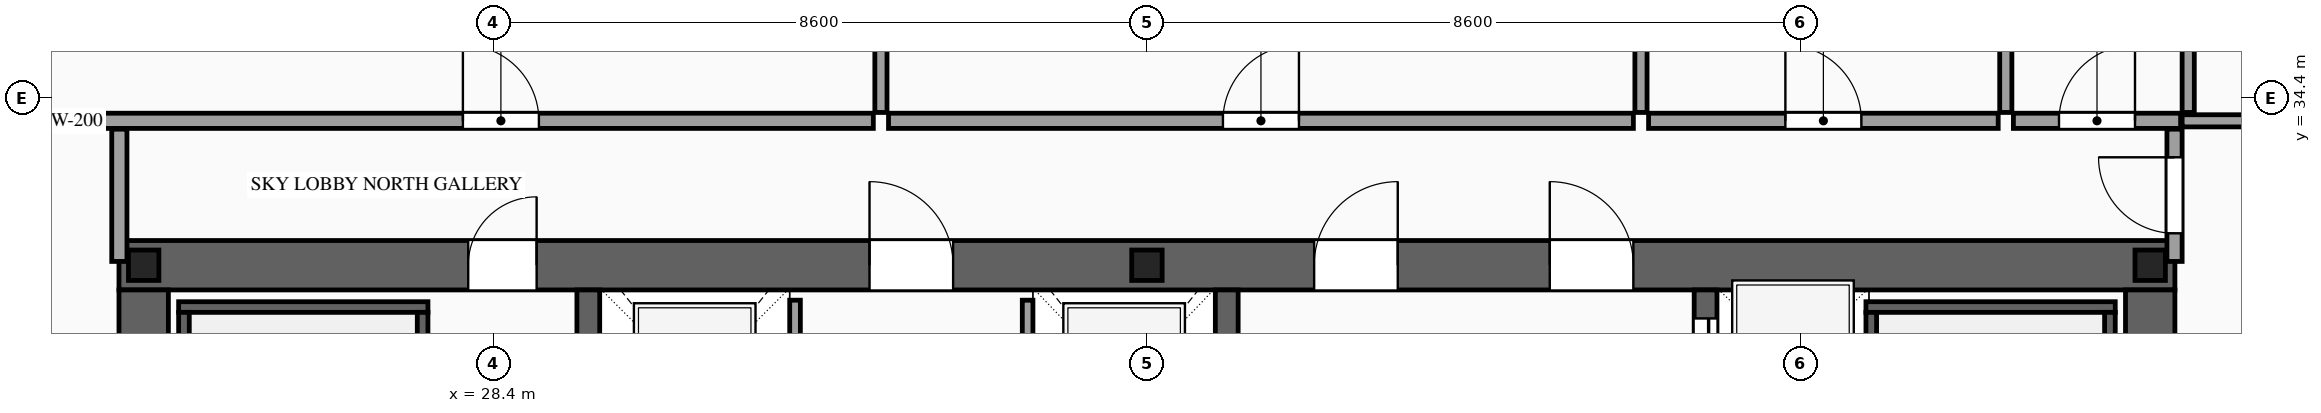
"""IFC4 building model, lengths in metres.
Left out: names, types, materials, properties, quantities, classifications, styles, units other than length and angle.
Written with IfcOpenShell. Run it as: python <this file> out.ifc"""

import sys

from ifc_helpers import new_model, si_unit, direction, frame, frame_2d, origin, origin_2d, place, context, subcontext, project, spatial, rectangle, i_section, extrude, source, transform, mapped, element, fill, save


model = new_model("IFC4")
c1 = context("Model", 3, precision=1e-05, world=origin(), true_north=direction((0.0, 1.0)))
c2 = subcontext(c1, "Body", "Model", "MODEL_VIEW")
j1 = project(units=[si_unit("LENGTHUNIT", "METRE"), si_unit("PLANEANGLEUNIT", "RADIAN")], contexts=[c1])
p1 = place(None, origin())
s1 = spatial("IfcSite", under=j1, at=p1, CompositionType="ELEMENT")
p2 = place(p1, origin())
s2 = spatial("IfcBuilding", under=s1, at=p2, CompositionType="ELEMENT")
p3 = place(p2, frame((0.0, 0.0, 166.8)))
s3 = spatial("IfcBuildingStorey", under=s2, at=p3, CompositionType="ELEMENT", Elevation=166.8)
p4 = place(p3, frame((23.475, 32.2, 0.0), z_axis=(0.0, 0.0, 1.0), x_axis=(1.0, 0.0, 0.0)))
e1 = element("IfcWall", 1, at=p4, inside=s3, PredefinedType="SHEAR", context=c2, shape_type="SweptSolid", body=[
    extrude(rectangle(XDim=27.05, YDim=0.65, at=frame_2d((13.525, 0.0))), origin(), (0.0, 0.0, 1.0), 4.8),
])
p5 = place(p4, frame((4.595, 0.0, 0.0)))
e2 = element("IfcOpeningElement", 2, at=p5, cuts=e1, PredefinedType="OPENING", context=c2, shape_type="SweptSolid", body=[
    extrude(rectangle(XDim=0.9, YDim=2.15, at=frame_2d((0.45, 1.075))), frame((0.0, 0.34, 0.0), z_axis=(0.0, -1.0, 0.0), x_axis=(1.0, 0.0, 0.0)), (0.0, 0.0, 1.0), 0.68),
])
p6 = place(p4, frame((9.875, 0.0, 0.0)))
e3 = element("IfcOpeningElement", 3, at=p6, cuts=e1, PredefinedType="OPENING", context=c2, shape_type="SweptSolid", body=[
    extrude(rectangle(XDim=1.1, YDim=2.2, at=frame_2d((0.55, 1.1))), frame((0.0, 0.34, 0.0), z_axis=(0.0, -1.0, 0.0), x_axis=(1.0, 0.0, 0.0)), (0.0, 0.0, 1.0), 0.68),
])
p7 = place(p4, frame((15.725, 0.0, 0.0)))
e4 = element("IfcOpeningElement", 4, at=p7, cuts=e1, PredefinedType="OPENING", context=c2, shape_type="SweptSolid", body=[
    extrude(rectangle(XDim=1.1, YDim=2.2, at=frame_2d((0.55, 1.1))), frame((0.0, 0.34, 0.0), z_axis=(0.0, -1.0, 0.0), x_axis=(1.0, 0.0, 0.0)), (0.0, 0.0, 1.0), 0.68),
])
p8 = place(p4, frame((18.825, 0.0, 0.0)))
e5 = element("IfcOpeningElement", 5, at=p8, cuts=e1, PredefinedType="OPENING", context=c2, shape_type="SweptSolid", body=[
    extrude(rectangle(XDim=1.1, YDim=2.2, at=frame_2d((0.55, 1.1))), frame((0.0, 0.34, 0.0), z_axis=(0.0, -1.0, 0.0), x_axis=(1.0, 0.0, 0.0)), (0.0, 0.0, 1.0), 0.68),
])
m1 = source(origin(), c2, "Body", "SweptSolid", [
    extrude(rectangle(XDim=12.15, YDim=0.65, at=frame_2d((6.075, 0.0))), origin(), (0.0, 0.0, 1.0), 4.8),
])
for number, where, z_axis, x_axis in (
    (6, (23.8, 19.725, 0.0), (0.0, 0.0, 1.0), (0.0, 1.0, 0.0)),
    (7, (50.2, 19.725, 0.0), (0.0, 0.0, 1.0), (0.0, 1.0, 0.0)),
):
    element("IfcWall", number, at=place(p3, frame(where, z_axis=z_axis, x_axis=x_axis)), inside=s3, PredefinedType="SHEAR", context=c2, shape_type="MappedRepresentation", body=[
        mapped(m1, transform((0.0, 0.0, 0.0), scale=1.0)),
    ])
m2 = source(origin(), c2, "Body", "SweptSolid", [
    extrude(rectangle(XDim=12.15, YDim=0.3, at=frame_2d((6.075, 0.0))), origin(), (0.0, 0.0, 1.0), 4.8),
])
for number, where, z_axis, x_axis in (
    (8, (29.65, 19.725, 0.0), (0.0, 0.0, 1.0), (0.0, 1.0, 0.0)),
    (9, (38.05, 19.725, 0.0), (0.0, 0.0, 1.0), (0.0, 1.0, 0.0)),
):
    element("IfcWall", number, at=place(p3, frame(where, z_axis=z_axis, x_axis=x_axis)), inside=s3, PredefinedType="SOLIDWALL", context=c2, shape_type="MappedRepresentation", body=[
        mapped(m2, transform((0.0, 0.0, 0.0), scale=1.0)),
    ])
p9 = place(p3, frame((44.35, 19.725, 0.0), z_axis=(0.0, 0.0, 1.0), x_axis=(0.0, 1.0, 0.0)))
e10 = element("IfcWall", 10, at=p9, inside=s3, PredefinedType="SOLIDWALL", context=c2, shape_type="SweptSolid", body=[
    extrude(rectangle(XDim=12.15, YDim=0.3, at=frame_2d((6.075, 0.0))), origin(), (0.0, 0.0, 1.0), 4.8),
])
p10 = place(p9, frame((6.475, 0.0, 0.0)))
e11 = element("IfcOpeningElement", 11, at=p10, cuts=e10, PredefinedType="OPENING", context=c2, shape_type="SweptSolid", body=[
    extrude(rectangle(XDim=1.1, YDim=2.2, at=frame_2d((0.55, 1.1))), frame((0.0, 0.165, 0.0), z_axis=(0.0, -1.0, 0.0), x_axis=(1.0, 0.0, 0.0)), (0.0, 0.0, 1.0), 0.33),
])
p11 = place(p9, frame((8.575, 0.0, 0.0)))
e12 = element("IfcOpeningElement", 12, at=p11, cuts=e10, PredefinedType="OPENING", context=c2, shape_type="SweptSolid", body=[
    extrude(rectangle(XDim=1.1, YDim=2.2, at=frame_2d((0.55, 1.1))), frame((0.0, 0.165, 0.0), z_axis=(0.0, -1.0, 0.0), x_axis=(1.0, 0.0, 0.0)), (0.0, 0.0, 1.0), 0.33),
])
p12 = place(p9, frame((10.675, 0.0, 0.0)))
e13 = element("IfcOpeningElement", 13, at=p12, cuts=e10, PredefinedType="OPENING", context=c2, shape_type="SweptSolid", body=[
    extrude(rectangle(XDim=1.1, YDim=2.2, at=frame_2d((0.55, 1.1))), frame((0.0, 0.165, 0.0), z_axis=(0.0, -1.0, 0.0), x_axis=(1.0, 0.0, 0.0)), (0.0, 0.0, 1.0), 0.33),
])
m3 = source(origin(), c2, "Body", "SweptSolid", [
    extrude(i_section(OverallWidth=0.4, OverallDepth=0.4, WebThickness=0.013, FlangeThickness=0.021, at=origin_2d()), origin(), (0.0, 0.0, 1.0), 4.8),
])
for number, where, z_axis, x_axis in (
    (14, (23.8, 32.2, 0.0), (0.0, 0.0, 1.0), (1.0, 0.0, 0.0)),
    (15, (37.0, 32.2, 0.0), (0.0, 0.0, 1.0), (1.0, 0.0, 0.0)),
    (16, (50.2, 32.2, 0.0), (0.0, 0.0, 1.0), (1.0, 0.0, 0.0)),
):
    element("IfcColumn", number, at=place(p3, frame(where, z_axis=z_axis, x_axis=x_axis)), inside=s3, PredefinedType="COLUMN", context=c2, shape_type="MappedRepresentation", body=[
        mapped(m3, transform((0.0, 0.0, 0.0), scale=1.0)),
    ])
p13 = place(p3, frame((32.37, 29.4, 0.0), z_axis=(0.0, 0.0, 1.0), x_axis=(0.0, 1.0, 0.0)))
e17 = element("IfcWall", 17, at=p13, inside=s3, PredefinedType="SOLIDWALL", context=c2, shape_type="SweptSolid", body=[
    extrude(rectangle(XDim=2.34, YDim=0.14, at=frame_2d((1.17, 0.0))), origin(), (0.0, 0.0, 1.0), 4.5),
])
p14 = place(p13, frame((0.62, 0.0, 0.0)))
e18 = element("IfcOpeningElement", 18, at=p14, cuts=e17, PredefinedType="OPENING", context=c2, shape_type="SweptSolid", body=[
    extrude(rectangle(XDim=1.1, YDim=2.2, at=frame_2d((0.55, 1.1))), frame((0.0, 0.085, 0.0), z_axis=(0.0, -1.0, 0.0), x_axis=(1.0, 0.0, 0.0)), (0.0, 0.0, 1.0), 0.17),
])
p15 = place(p3, frame((35.43, 29.4, 0.0), z_axis=(0.0, 0.0, 1.0), x_axis=(0.0, 1.0, 0.0)))
e19 = element("IfcWall", 19, at=p15, inside=s3, PredefinedType="SOLIDWALL", context=c2, shape_type="SweptSolid", body=[
    extrude(rectangle(XDim=2.34, YDim=0.14, at=frame_2d((1.17, 0.0))), origin(), (0.0, 0.0, 1.0), 4.5),
])
p16 = place(p15, frame((0.62, 0.0, 0.0)))
e20 = element("IfcOpeningElement", 20, at=p16, cuts=e19, PredefinedType="OPENING", context=c2, shape_type="SweptSolid", body=[
    extrude(rectangle(XDim=1.1, YDim=2.2, at=frame_2d((0.55, 1.1))), frame((0.0, 0.085, 0.0), z_axis=(0.0, -1.0, 0.0), x_axis=(1.0, 0.0, 0.0)), (0.0, 0.0, 1.0), 0.17),
])
m4 = source(origin(), c2, "Body", "SweptSolid", [
    extrude(rectangle(XDim=3.28, YDim=0.14, at=frame_2d((1.64, 0.0))), origin(), (0.0, 0.0, 1.0), 4.5),
])
p17 = place(p3, frame((24.26, 31.65, 0.0), z_axis=(0.0, 0.0, 1.0), x_axis=(1.0, 0.0, 0.0)))
e21 = element("IfcWall", 21, at=p17, inside=s3, PredefinedType="SOLIDWALL", context=c2, shape_type="MappedRepresentation", body=[
    mapped(m4, transform((0.0, 0.0, 0.0), scale=1.0)),
])
m5 = source(origin(), c2, "Body", "SweptSolid", [
    extrude(rectangle(XDim=8.94, YDim=0.14, at=frame_2d((4.47, 0.0))), origin(), (0.0, 0.0, 1.0), 4.5),
])
for number, where, z_axis, x_axis in (
    (22, (24.33, 22.64, 0.0), (0.0, 0.0, 1.0), (0.0, 1.0, 0.0)),
    (23, (27.47, 22.64, 0.0), (0.0, 0.0, 1.0), (0.0, 1.0, 0.0)),
):
    element("IfcWall", number, at=place(p3, frame(where, z_axis=z_axis, x_axis=x_axis)), inside=s3, PredefinedType="SOLIDWALL", context=c2, shape_type="MappedRepresentation", body=[
        mapped(m5, transform((0.0, 0.0, 0.0), scale=1.0)),
    ])
p18 = place(p3, frame((46.46, 31.65, 0.0), z_axis=(0.0, 0.0, 1.0), x_axis=(1.0, 0.0, 0.0)))
e24 = element("IfcWall", 24, at=p18, inside=s3, PredefinedType="SOLIDWALL", context=c2, shape_type="MappedRepresentation", body=[
    mapped(m4, transform((0.0, 0.0, 0.0), scale=1.0)),
])
for number, where, z_axis, x_axis in (
    (25, (46.53, 22.64, 0.0), (0.0, 0.0, 1.0), (0.0, 1.0, 0.0)),
    (26, (49.67, 22.64, 0.0), (0.0, 0.0, 1.0), (0.0, 1.0, 0.0)),
):
    element("IfcWall", number, at=place(p3, frame(where, z_axis=z_axis, x_axis=x_axis)), inside=s3, PredefinedType="SOLIDWALL", context=c2, shape_type="MappedRepresentation", body=[
        mapped(m5, transform((0.0, 0.0, 0.0), scale=1.0)),
    ])
m6 = source(origin(), c2, "Body", "SweptSolid", [
    extrude(rectangle(XDim=1.74, YDim=0.2, at=frame_2d((0.87, 0.0))), origin(), (0.0, 0.0, 1.0), 4.5),
])
p19 = place(p3, frame((23.48, 32.25, 0.0), z_axis=(0.0, 0.0, 1.0), x_axis=(0.0, 1.0, 0.0)))
e27 = element("IfcWall", 27, at=p19, inside=s3, PredefinedType="PARTITIONING", context=c2, shape_type="MappedRepresentation", body=[
    mapped(m6, transform((0.0, 0.0, 0.0), scale=1.0)),
])
p20 = place(p3, frame((50.52, 32.25, 0.0), z_axis=(0.0, 0.0, 1.0), x_axis=(0.0, 1.0, 0.0)))
e28 = element("IfcWall", 28, at=p20, inside=s3, PredefinedType="PARTITIONING", context=c2, shape_type="SweptSolid", body=[
    extrude(rectangle(XDim=1.74, YDim=0.2, at=frame_2d((0.87, 0.0))), origin(), (0.0, 0.0, 1.0), 4.5),
])
p21 = place(p20, frame((0.37, 0.0, 0.0)))
e29 = element("IfcOpeningElement", 29, at=p21, cuts=e28, PredefinedType="OPENING", context=c2, shape_type="SweptSolid", body=[
    extrude(rectangle(XDim=1.0, YDim=2.2, at=frame_2d((0.5, 1.1))), frame((0.0, 0.115, 0.0), z_axis=(0.0, -1.0, 0.0), x_axis=(1.0, 0.0, 0.0)), (0.0, 0.0, 1.0), 0.23),
])
m7 = source(origin(), c2, "Body", "SweptSolid", [
    extrude(rectangle(XDim=8.33, YDim=0.16, at=frame_2d((4.165, 0.0))), origin(), (0.0, 0.0, 1.0), 4.5),
])
p22 = place(p3, frame((50.62, 34.1, 0.0), z_axis=(0.0, 0.0, 1.0), x_axis=(1.0, 0.0, 0.0)))
e30 = element("IfcWall", 30, at=p22, inside=s3, PredefinedType="PARTITIONING", context=c2, shape_type="MappedRepresentation", body=[
    mapped(m7, transform((0.0, 0.0, 0.0), scale=1.0)),
])
p23 = place(p3, frame((17.94, 34.1, 0.0), z_axis=(0.0, 0.0, 1.0), x_axis=(1.0, 0.0, 0.0)))
e31 = element("IfcWall", 31, at=p23, inside=s3, PredefinedType="PARTITIONING", context=c2, shape_type="SweptSolid", body=[
    extrude(rectangle(XDim=15.46, YDim=0.2, at=frame_2d((7.73, 0.0))), origin(), (0.0, 0.0, 1.0), 4.5),
])
p24 = place(p23, frame((10.06, 0.0, 0.0)))
e32 = element("IfcOpeningElement", 32, at=p24, cuts=e31, PredefinedType="OPENING", context=c2, shape_type="SweptSolid", body=[
    extrude(rectangle(XDim=1.0, YDim=2.2, at=frame_2d((0.5, 1.1))), frame((0.0, 0.115, 0.0), z_axis=(0.0, -1.0, 0.0), x_axis=(1.0, 0.0, 0.0)), (0.0, 0.0, 1.0), 0.23),
])
m8 = source(origin(), c2, "Body", "SweptSolid", [
    extrude(rectangle(XDim=13.54, YDim=0.16, at=frame_2d((6.77, 0.0))), origin(), (0.0, 0.0, 1.0), 4.5),
])
p25 = place(p3, frame((33.5, 34.21, 0.0), z_axis=(0.0, 0.0, 1.0), x_axis=(0.0, 1.0, 0.0)))
e33 = element("IfcWall", 33, at=p25, inside=s3, PredefinedType="PARTITIONING", context=c2, shape_type="MappedRepresentation", body=[
    mapped(m8, transform((0.0, 0.0, 0.0), scale=1.0)),
])
p26 = place(p3, frame((33.6, 34.1, 0.0), z_axis=(0.0, 0.0, 1.0), x_axis=(1.0, 0.0, 0.0)))
e34 = element("IfcWall", 34, at=p26, inside=s3, PredefinedType="PARTITIONING", context=c2, shape_type="SweptSolid", body=[
    extrude(rectangle(XDim=9.8, YDim=0.2, at=frame_2d((4.9, 0.0))), origin(), (0.0, 0.0, 1.0), 4.5),
])
p27 = place(p26, frame((4.4, 0.0, 0.0)))
e35 = element("IfcOpeningElement", 35, at=p27, cuts=e34, PredefinedType="OPENING", context=c2, shape_type="SweptSolid", body=[
    extrude(rectangle(XDim=1.0, YDim=2.2, at=frame_2d((0.5, 1.1))), frame((0.0, 0.115, 0.0), z_axis=(0.0, -1.0, 0.0), x_axis=(1.0, 0.0, 0.0)), (0.0, 0.0, 1.0), 0.23),
])
p28 = place(p3, frame((43.5, 34.21, 0.0), z_axis=(0.0, 0.0, 1.0), x_axis=(0.0, 1.0, 0.0)))
e36 = element("IfcWall", 36, at=p28, inside=s3, PredefinedType="PARTITIONING", context=c2, shape_type="MappedRepresentation", body=[
    mapped(m8, transform((0.0, 0.0, 0.0), scale=1.0)),
])
p29 = place(p3, frame((43.6, 34.1, 0.0), z_axis=(0.0, 0.0, 1.0), x_axis=(1.0, 0.0, 0.0)))
e37 = element("IfcWall", 37, at=p29, inside=s3, PredefinedType="PARTITIONING", context=c2, shape_type="SweptSolid", body=[
    extrude(rectangle(XDim=4.6, YDim=0.2, at=frame_2d((2.3, 0.0))), origin(), (0.0, 0.0, 1.0), 4.5),
])
p30 = place(p29, frame((1.8, 0.0, 0.0)))
e38 = element("IfcOpeningElement", 38, at=p30, cuts=e37, PredefinedType="OPENING", context=c2, shape_type="SweptSolid", body=[
    extrude(rectangle(XDim=1.0, YDim=2.2, at=frame_2d((0.5, 1.1))), frame((0.0, 0.115, 0.0), z_axis=(0.0, -1.0, 0.0), x_axis=(1.0, 0.0, 0.0)), (0.0, 0.0, 1.0), 0.23),
])
p31 = place(p3, frame((48.3, 34.21, 0.0), z_axis=(0.0, 0.0, 1.0), x_axis=(0.0, 1.0, 0.0)))
e39 = element("IfcWall", 39, at=p31, inside=s3, PredefinedType="PARTITIONING", context=c2, shape_type="MappedRepresentation", body=[
    mapped(m8, transform((0.0, 0.0, 0.0), scale=1.0)),
])
p32 = place(p3, frame((48.4, 34.1, 0.0), z_axis=(0.0, 0.0, 1.0), x_axis=(1.0, 0.0, 0.0)))
e40 = element("IfcWall", 40, at=p32, inside=s3, PredefinedType="PARTITIONING", context=c2, shape_type="SweptSolid", body=[
    extrude(rectangle(XDim=2.2, YDim=0.2, at=frame_2d((1.1, 0.0))), origin(), (0.0, 0.0, 1.0), 4.5),
])
p33 = place(p32, frame((0.6, 0.0, 0.0)))
e41 = element("IfcOpeningElement", 41, at=p33, cuts=e40, PredefinedType="OPENING", context=c2, shape_type="SweptSolid", body=[
    extrude(rectangle(XDim=1.0, YDim=2.2, at=frame_2d((0.5, 1.1))), frame((0.0, 0.115, 0.0), z_axis=(0.0, -1.0, 0.0), x_axis=(1.0, 0.0, 0.0)), (0.0, 0.0, 1.0), 0.23),
])
p34 = place(p3, frame((50.7, 34.21, 0.0), z_axis=(0.0, 0.0, 1.0), x_axis=(0.0, 1.0, 0.0)))
e42 = element("IfcWall", 42, at=p34, inside=s3, PredefinedType="PARTITIONING", context=c2, shape_type="MappedRepresentation", body=[
    mapped(m8, transform((0.0, 0.0, 0.0), scale=1.0)),
])
m9 = source(origin(), c2, "Body", "SweptSolid", [
    extrude(rectangle(XDim=1.1, YDim=2.2, at=frame_2d((0.55, 1.1))), frame((0.0, 0.025, 0.0), z_axis=(0.0, -1.0, 0.0), x_axis=(1.0, 0.0, 0.0)), (0.0, 0.0, 1.0), 0.05),
])
p35 = place(p12, origin())
e43 = element("IfcDoor", 43, at=p35, inside=s3, OperationType="SLIDING_TO_LEFT", PredefinedType="DOOR", context=c2, shape_type="MappedRepresentation", body=[
    mapped(m9, transform((0.0, 0.0, 0.0), scale=1.0)),
])
fill(e13, e43)
m10 = source(origin(), c2, "Body", "SweptSolid", [
    extrude(rectangle(XDim=0.9, YDim=2.15, at=frame_2d((0.45, 1.075))), frame((0.0, 0.025, 0.0), z_axis=(0.0, -1.0, 0.0), x_axis=(1.0, 0.0, 0.0)), (0.0, 0.0, 1.0), 0.05),
])
p36 = place(p5, origin())
e44 = element("IfcDoor", 44, at=p36, inside=s3, OperationType="SINGLE_SWING_RIGHT", PredefinedType="DOOR", context=c2, shape_type="MappedRepresentation", body=[
    mapped(m10, transform((0.0, 0.0, 0.0), scale=1.0)),
])
fill(e2, e44)
m11 = source(origin(), c2, "Body", "SweptSolid", [
    extrude(rectangle(XDim=1.1, YDim=2.2, at=frame_2d((0.55, 1.1))), frame((0.0, 0.025, 0.0), z_axis=(0.0, -1.0, 0.0), x_axis=(1.0, 0.0, 0.0)), (0.0, 0.0, 1.0), 0.05),
])
p37 = place(p6, origin())
e45 = element("IfcDoor", 45, at=p37, inside=s3, OperationType="SINGLE_SWING_LEFT", PredefinedType="DOOR", context=c2, shape_type="MappedRepresentation", body=[
    mapped(m11, transform((0.0, 0.0, 0.0), scale=1.0)),
])
fill(e3, e45)
p38 = place(p7, origin())
e46 = element("IfcDoor", 46, at=p38, inside=s3, OperationType="SINGLE_SWING_RIGHT", PredefinedType="DOOR", context=c2, shape_type="MappedRepresentation", body=[
    mapped(m11, transform((0.0, 0.0, 0.0), scale=1.0)),
])
fill(e4, e46)
p39 = place(p8, origin())
e47 = element("IfcDoor", 47, at=p39, inside=s3, OperationType="SINGLE_SWING_LEFT", PredefinedType="DOOR", context=c2, shape_type="MappedRepresentation", body=[
    mapped(m11, transform((0.0, 0.0, 0.0), scale=1.0)),
])
fill(e5, e47)
m12 = source(origin(), c2, "Body", "SweptSolid", [
    extrude(rectangle(XDim=1.0, YDim=2.2, at=frame_2d((0.5, 1.1))), frame((0.0, 0.025, 0.0), z_axis=(0.0, -1.0, 0.0), x_axis=(1.0, 0.0, 0.0)), (0.0, 0.0, 1.0), 0.05),
])
p40 = place(p21, origin())
e48 = element("IfcDoor", 48, at=p40, inside=s3, OperationType="SINGLE_SWING_RIGHT", PredefinedType="DOOR", context=c2, shape_type="MappedRepresentation", body=[
    mapped(m12, transform((0.0, 0.0, 0.0), scale=1.0)),
])
fill(e29, e48)
p41 = place(p24, origin())
e49 = element("IfcDoor", 49, at=p41, inside=s3, OperationType="SINGLE_SWING_LEFT", PredefinedType="DOOR", context=c2, shape_type="MappedRepresentation", body=[
    mapped(m12, transform((0.0, 0.0, 0.0), scale=1.0)),
])
fill(e32, e49)
p42 = place(p27, origin())
e50 = element("IfcDoor", 50, at=p42, inside=s3, OperationType="SINGLE_SWING_RIGHT", PredefinedType="DOOR", context=c2, shape_type="MappedRepresentation", body=[
    mapped(m12, transform((0.0, 0.0, 0.0), scale=1.0)),
])
fill(e35, e50)
p43 = place(p30, origin())
e51 = element("IfcDoor", 51, at=p43, inside=s3, OperationType="SINGLE_SWING_LEFT", PredefinedType="DOOR", context=c2, shape_type="MappedRepresentation", body=[
    mapped(m12, transform((0.0, 0.0, 0.0), scale=1.0)),
])
fill(e38, e51)
p44 = place(p33, origin())
e52 = element("IfcDoor", 52, at=p44, inside=s3, OperationType="SINGLE_SWING_RIGHT", PredefinedType="DOOR", context=c2, shape_type="MappedRepresentation", body=[
    mapped(m12, transform((0.0, 0.0, 0.0), scale=1.0)),
])
fill(e41, e52)
save(model, sys.argv[1])
